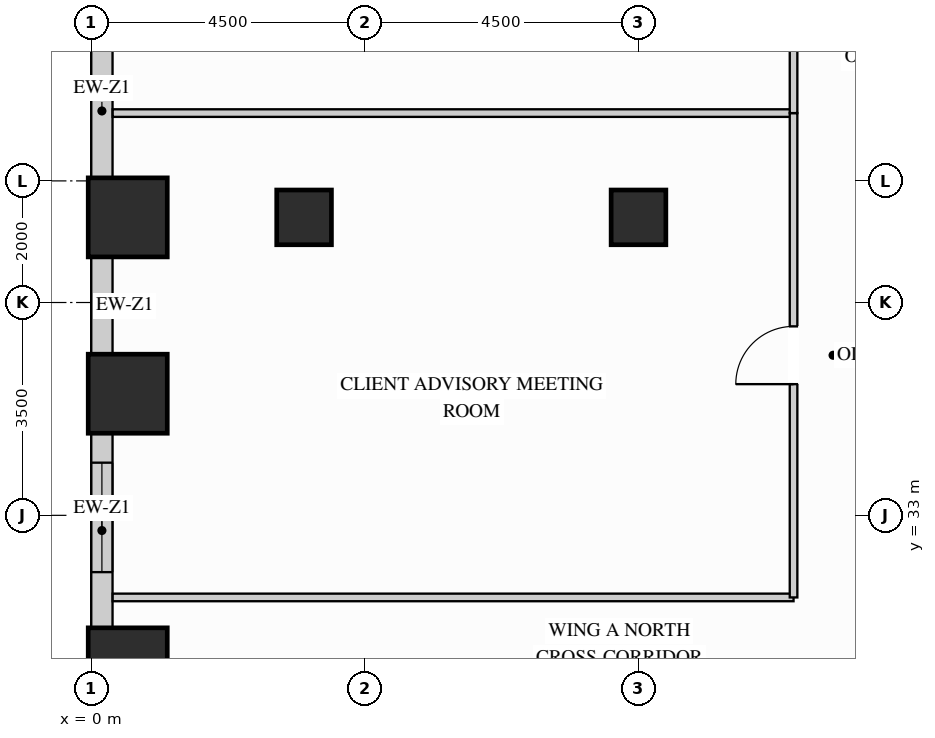
"""IFC4 building model, lengths in metres.
Left out: names, types, materials, properties, quantities, classifications, styles, units other than length and angle.
Written with IfcOpenShell. Run it as: python <this file> out.ifc"""

import sys

from ifc_helpers import new_model, si_unit, direction, frame, frame_2d, origin, origin_2d, place, context, subcontext, project, spatial, rectangle, extrude, source, transform, mapped, element, fill, save


model = new_model("IFC4")
c1 = context("Model", 3, precision=1e-05, world=origin(), true_north=direction((0.0, 1.0)))
c2 = subcontext(c1, "Body", "Model", "MODEL_VIEW")
j1 = project(units=[si_unit("LENGTHUNIT", "METRE"), si_unit("PLANEANGLEUNIT", "RADIAN")], contexts=[c1])
p1 = place(None, origin())
s1 = spatial("IfcSite", under=j1, at=p1, CompositionType="ELEMENT")
p2 = place(p1, origin())
s2 = spatial("IfcBuilding", under=s1, at=p2, CompositionType="ELEMENT")
p3 = place(p2, frame((0.0, 0.0, 62.1)))
s3 = spatial("IfcBuildingStorey", under=s2, at=p3, CompositionType="ELEMENT", Elevation=62.1)
m1 = source(origin(), c2, "Body", "SweptSolid", [
    extrude(rectangle(XDim=0.9, YDim=0.9, at=origin_2d()), origin(), (0.0, 0.0, 1.0), 3.38),
])
for number, where, z_axis, x_axis in (
    (1, (3.5, 37.9, 0.0), (0.0, 0.0, 1.0), (1.0, 0.0, 0.0)),
    (2, (9.0, 37.9, 0.0), (0.0, 0.0, 1.0), (1.0, 0.0, 0.0)),
):
    element("IfcColumn", number, at=place(p3, frame(where, z_axis=z_axis, x_axis=x_axis)), inside=s3, PredefinedType="COLUMN", context=c2, shape_type="MappedRepresentation", body=[
        mapped(m1, transform((0.0, 0.0, 0.0), x_axis=(1.0, 0.0, 0.0), y_axis=(0.0, 1.0, 0.0), z_axis=(0.0, 0.0, 1.0))),
    ])
m2 = source(origin(), c2, "Body", "SweptSolid", [
    extrude(rectangle(XDim=1.3, YDim=1.3, at=origin_2d()), origin(), (0.0, 0.0, 1.0), 3.38),
])
for number, where, z_axis, x_axis in (
    (3, (0.6, 30.5, 0.0), (0.0, 0.0, 1.0), (1.0, 0.0, 0.0)),
    (4, (0.6, 35.0, 0.0), (0.0, 0.0, 1.0), (1.0, 0.0, 0.0)),
    (5, (0.6, 37.9, 0.0), (0.0, 0.0, 1.0), (1.0, 0.0, 0.0)),
):
    element("IfcColumn", number, at=place(p3, frame(where, z_axis=z_axis, x_axis=x_axis)), inside=s3, PredefinedType="COLUMN", context=c2, shape_type="MappedRepresentation", body=[
        mapped(m2, transform((0.0, 0.0, 0.0), x_axis=(1.0, 0.0, 0.0), y_axis=(0.0, 1.0, 0.0), z_axis=(0.0, 0.0, 1.0))),
    ])
m3 = source(origin(), c2, "Body", "SweptSolid", [
    extrude(rectangle(XDim=2.204, YDim=0.35, at=frame_2d((1.102, 0.0))), origin(), (0.0, 0.0, 1.0), 2.51),
])
p4 = place(p3, frame((0.175, 40.752, 0.0), z_axis=(0.0, 0.0, 1.0), x_axis=(0.0, -1.0, 0.0)))
e6 = element("IfcWall", 6, at=p4, inside=s3, PredefinedType="SOLIDWALL", context=c2, shape_type="MappedRepresentation", body=[
    mapped(m3, transform((0.0, 0.0, 0.0), x_axis=(1.0, 0.0, 0.0), y_axis=(0.0, 1.0, 0.0), z_axis=(0.0, 0.0, 1.0))),
])
m4 = source(origin(), c2, "Body", "SweptSolid", [
    extrude(rectangle(XDim=1.604, YDim=0.35, at=frame_2d((0.802, 0.0))), origin(), (0.0, 0.0, 1.0), 2.51),
])
p5 = place(p3, frame((0.175, 37.252, 0.0), z_axis=(0.0, 0.0, 1.0), x_axis=(0.0, -1.0, 0.0)))
e7 = element("IfcWall", 7, at=p5, inside=s3, PredefinedType="SOLIDWALL", context=c2, shape_type="MappedRepresentation", body=[
    mapped(m4, transform((0.0, 0.0, 0.0), x_axis=(1.0, 0.0, 0.0), y_axis=(0.0, 1.0, 0.0), z_axis=(0.0, 0.0, 1.0))),
])
p6 = place(p3, frame((0.175, 34.352, 0.0), z_axis=(0.0, 0.0, 1.0), x_axis=(0.0, -1.0, 0.0)))
e8 = element("IfcWall", 8, at=p6, inside=s3, PredefinedType="SOLIDWALL", context=c2, shape_type="SweptSolid", body=[
    extrude(rectangle(XDim=3.204, YDim=0.35, at=frame_2d((1.602, 0.0))), origin(), (0.0, 0.0, 1.0), 2.51),
])
p7 = place(p6, frame((0.486, 0.0, 0.78)))
e9 = element("IfcOpeningElement", 9, at=p7, cuts=e8, PredefinedType="OPENING", context=c2, shape_type="SweptSolid", body=[
    extrude(rectangle(XDim=1.8, YDim=1.55, at=frame_2d((0.9, 0.775))), frame((0.0, 0.185, 0.0), z_axis=(0.0, -1.0, 0.0), x_axis=(1.0, 0.0, 0.0)), (0.0, 0.0, 1.0), 0.37),
])
m5 = source(origin(), c2, "Body", "SweptSolid", [
    extrude(rectangle(XDim=11.198, YDim=0.125, at=frame_2d((5.599, 0.0))), origin(), (0.0, 0.0, 1.0), 2.828),
])
for number, where, z_axis, x_axis in (
    (10, (0.352, 31.65, 0.0), (0.0, 0.0, 1.0), (1.0, 0.0, 0.0)),
    (11, (0.352, 39.615, 0.0), (0.0, 0.0, 1.0), (1.0, 0.0, 0.0)),
):
    element("IfcWall", number, at=place(p3, frame(where, z_axis=z_axis, x_axis=x_axis)), inside=s3, PredefinedType="PARTITIONING", context=c2, shape_type="MappedRepresentation", body=[
        mapped(m5, transform((0.0, 0.0, 0.0), x_axis=(1.0, 0.0, 0.0), y_axis=(0.0, 1.0, 0.0), z_axis=(0.0, 0.0, 1.0))),
    ])
p8 = place(p3, frame((11.55, 31.65, 0.0), z_axis=(0.0, 0.0, 1.0), x_axis=(0.0, 1.0, 0.0)))
e12 = element("IfcWall", 12, at=p8, inside=s3, PredefinedType="PARTITIONING", context=c2, shape_type="SweptSolid", body=[
    extrude(rectangle(XDim=7.965, YDim=0.125, at=frame_2d((3.982, 0.0))), origin(), (0.0, 0.0, 1.0), 3.365),
])
p9 = place(p8, frame((3.508, 0.0, 0.0)))
e13 = element("IfcOpeningElement", 13, at=p9, cuts=e12, PredefinedType="OPENING", context=c2, shape_type="SweptSolid", body=[
    extrude(rectangle(XDim=0.95, YDim=2.15, at=frame_2d((0.475, 1.075))), frame((0.0, 0.073, 0.0), z_axis=(0.0, -1.0, 0.0), x_axis=(1.0, 0.0, 0.0)), (0.0, 0.0, 1.0), 0.145),
])
p10 = place(p3, frame((11.55, 39.615, 0.0), z_axis=(0.0, 0.0, 1.0), x_axis=(0.0, 1.0, 0.0)))
e14 = element("IfcWall", 14, at=p10, inside=s3, PredefinedType="PARTITIONING", context=c2, shape_type="SweptSolid", body=[
    extrude(rectangle(XDim=6.785, YDim=0.125, at=frame_2d((3.393, 0.0))), origin(), (0.0, 0.0, 1.0), 3.365),
])
p11 = place(p10, frame((2.917, 0.0, 0.0)))
e15 = element("IfcOpeningElement", 15, at=p11, cuts=e14, PredefinedType="OPENING", context=c2, shape_type="SweptSolid", body=[
    extrude(rectangle(XDim=0.95, YDim=2.15, at=frame_2d((0.475, 1.075))), frame((0.0, 0.073, 0.0), z_axis=(0.0, -1.0, 0.0), x_axis=(1.0, 0.0, 0.0)), (0.0, 0.0, 1.0), 0.145),
])
m6 = source(origin(), c2, "Body", "SweptSolid", [
    extrude(rectangle(XDim=0.95, YDim=2.15, at=frame_2d((0.475, 1.075))), frame((0.0, 0.025, 0.0), z_axis=(0.0, -1.0, 0.0), x_axis=(1.0, 0.0, 0.0)), (0.0, 0.0, 1.0), 0.05),
])
p12 = place(p9, origin())
e16 = element("IfcDoor", 16, at=p12, inside=s3, OperationType="SINGLE_SWING_LEFT", PredefinedType="DOOR", context=c2, shape_type="MappedRepresentation", body=[
    mapped(m6, transform((0.0, 0.0, 0.0), x_axis=(1.0, 0.0, 0.0), y_axis=(0.0, 1.0, 0.0), z_axis=(0.0, 0.0, 1.0))),
])
fill(e13, e16)
m7 = source(origin(), c2, "Body", "SweptSolid", [
    extrude(rectangle(XDim=1.8, YDim=1.55, at=frame_2d((0.9, 0.775))), frame((0.0, 0.03, 0.0), z_axis=(0.0, -1.0, 0.0), x_axis=(1.0, 0.0, 0.0)), (0.0, 0.0, 1.0), 0.06),
])
p13 = place(p7, origin())
e17 = element("IfcWindow", 17, at=p13, inside=s3, PartitioningType="SINGLE_PANEL", PredefinedType="WINDOW", context=c2, shape_type="MappedRepresentation", body=[
    mapped(m7, transform((0.0, 0.0, 0.0), x_axis=(1.0, 0.0, 0.0), y_axis=(0.0, 1.0, 0.0), z_axis=(0.0, 0.0, 1.0))),
])
fill(e9, e17)
save(model, sys.argv[1])
